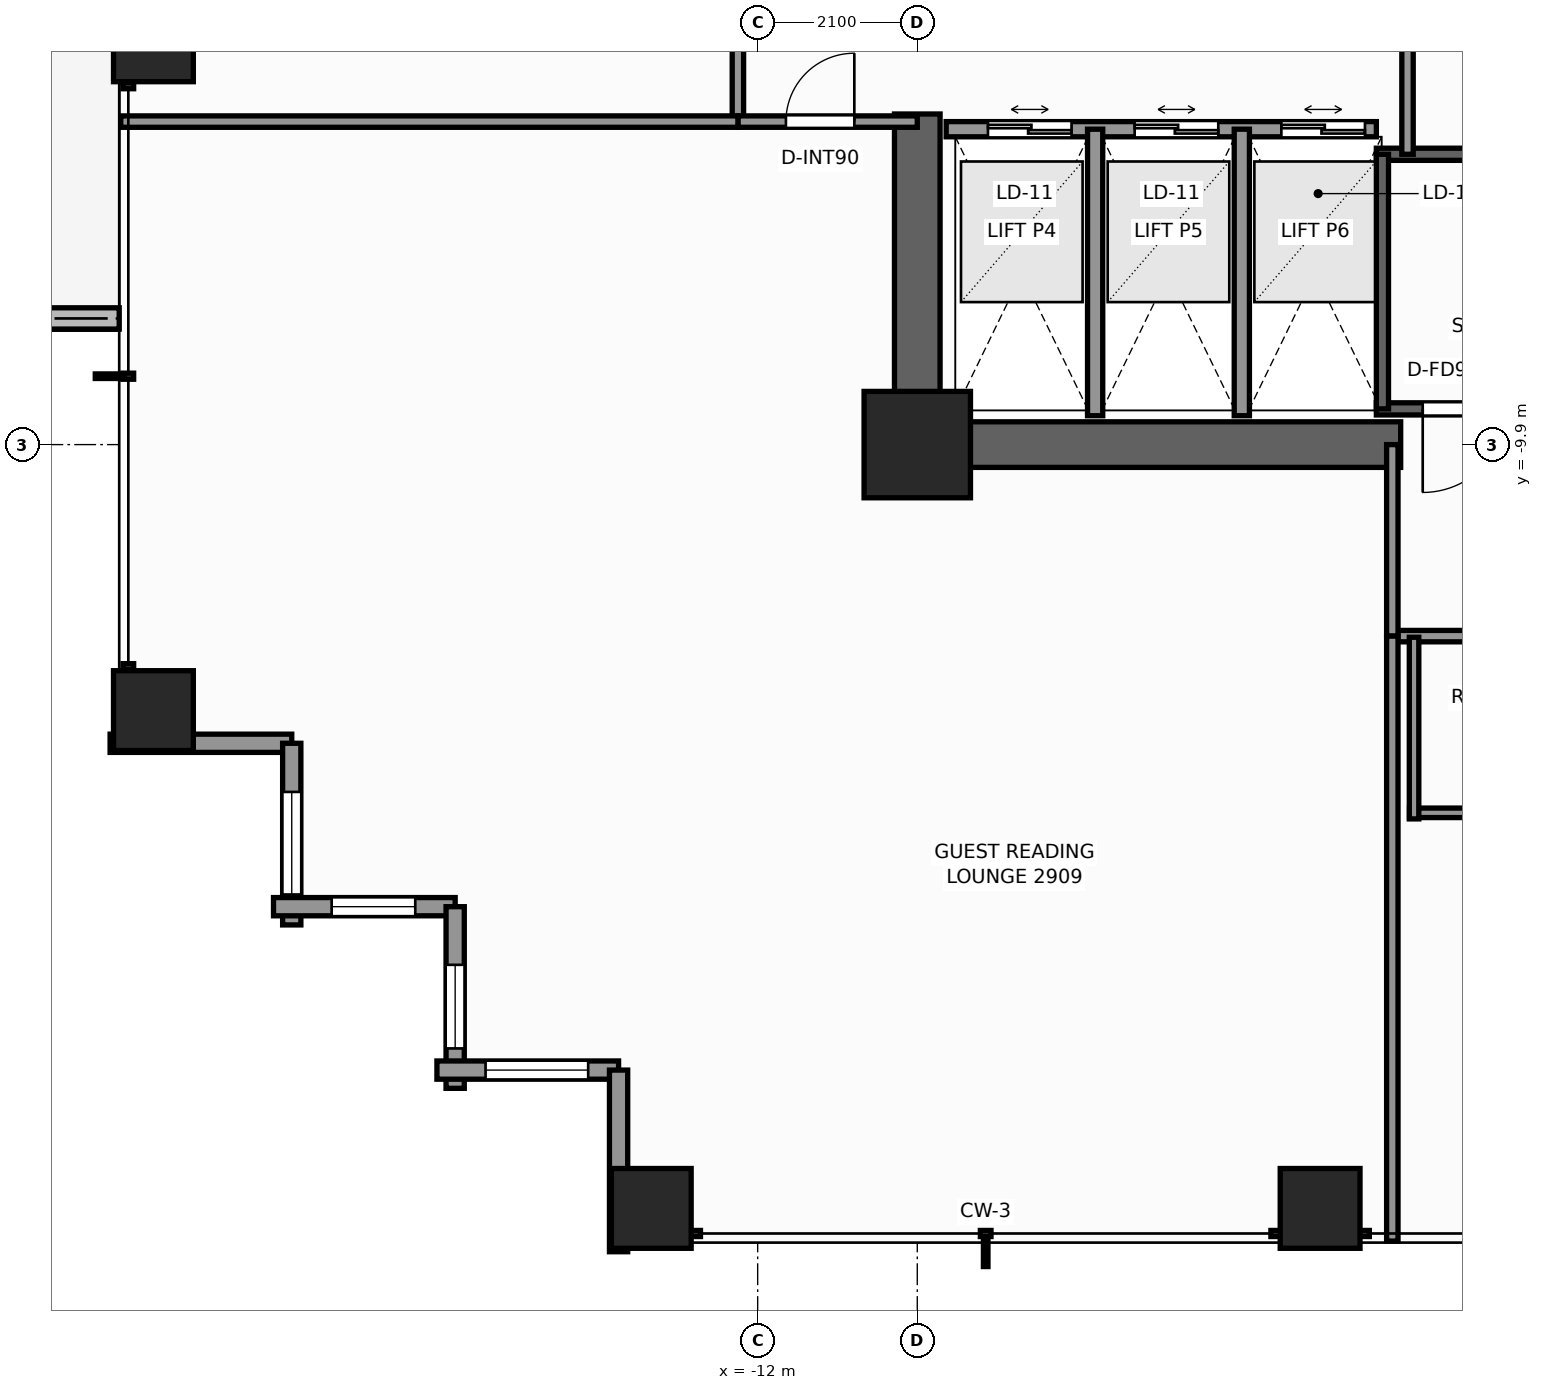
"""IFC4 building model, lengths in metres.
Left out: names, types, materials, properties, quantities, classifications, styles, units other than length and angle.
Written with IfcOpenShell. Run it as: python <this file> out.ifc"""

import sys

from ifc_helpers import new_model, si_unit, direction, frame, frame_2d, origin, origin_2d, place, context, subcontext, project, spatial, rectangle, extrude, element, fill, save


model = new_model("IFC4")
c1 = context("Model", 3, precision=1e-05, world=origin(), true_north=direction((0.0, 1.0)))
c2 = subcontext(c1, "Body", "Model", "MODEL_VIEW")
j1 = project(units=[si_unit("LENGTHUNIT", "METRE"), si_unit("PLANEANGLEUNIT", "RADIAN")], contexts=[c1])
p1 = place(None, origin())
s1 = spatial("IfcSite", under=j1, at=p1, CompositionType="ELEMENT")
p2 = place(p1, origin())
s2 = spatial("IfcBuilding", under=s1, at=p2, CompositionType="ELEMENT")
p3 = place(p2, frame((0.0, 0.0, 101.9)))
s3 = spatial("IfcBuildingStorey", under=s2, at=p3, CompositionType="ELEMENT", Elevation=101.9)
p4 = place(p3, frame((-3.54, -9.9, 0.0), z_axis=(0.0, 0.0, 1.0), x_axis=(-1.0, 0.0, 0.0)))
e1 = element("IfcWall", 1, at=p4, inside=s3, PredefinedType="SHEAR", context=c2, shape_type="SweptSolid", body=[
    extrude(rectangle(XDim=6.66, YDim=0.6, at=frame_2d((3.33, 0.0))), origin(), (0.0, 0.0, 1.0), 3.3),
])
p5 = place(p3, frame((-9.9, -9.6, 0.0), z_axis=(0.0, 0.0, 1.0), x_axis=(0.0, 1.0, 0.0)))
e2 = element("IfcWall", 2, at=p5, inside=s3, PredefinedType="SHEAR", context=c2, shape_type="SweptSolid", body=[
    extrude(rectangle(XDim=4.05, YDim=0.6, at=frame_2d((2.025, 0.0))), origin(), (0.0, 0.0, 1.0), 3.3),
])
p6 = place(p3, frame((-9.9, -9.9, 0.0), z_axis=(0.0, 0.0, 1.0), x_axis=(1.0, 0.0, 0.0)))
e3 = element("IfcColumn", 3, at=p6, inside=s3, PredefinedType="COLUMN", context=c2, shape_type="SweptSolid", body=[
    extrude(rectangle(XDim=1.4, YDim=1.4, at=origin_2d()), origin(), (0.0, 0.0, 1.0), 3.3),
])
for number, where, z_axis, x_axis in (
    (4, (-13.4, -19.95, 0.0), (0.0, 0.0, 1.0), (1.0, 0.0, 0.0)),
    (5, (-4.6, -19.95, 0.0), (0.0, 0.0, 1.0), (1.0, 0.0, 0.0)),
    (6, (-19.95, -13.4, 0.0), (0.0, 0.0, 1.0), (1.0, 0.0, 0.0)),
    (7, (-19.95, -4.6, 0.0), (0.0, 0.0, 1.0), (1.0, 0.0, 0.0)),
):
    element("IfcColumn", number, at=place(p3, frame(where, z_axis=z_axis, x_axis=x_axis)), inside=s3, PredefinedType="COLUMN", context=c2, shape_type="SweptSolid", body=[
        extrude(rectangle(XDim=1.05, YDim=1.05, at=origin_2d()), origin(), (0.0, 0.0, 1.0), 3.3),
    ])
p7 = place(p3, frame((-22.406, -8.24, -0.04), z_axis=(0.0, 0.0, 1.0), x_axis=(1.0, 0.0, 0.0)))
e8 = element("IfcWall", 8, at=p7, inside=s3, PredefinedType="PARAPET", context=c2, shape_type="SweptSolid", body=[
    extrude(rectangle(XDim=2.006, YDim=0.28, at=frame_2d((1.003, 0.0))), origin(), (0.0, 0.0, 1.0), 0.42),
])
p8 = place(p3, frame((-18.13, -13.83, 0.0), z_axis=(0.0, 0.0, 1.0), x_axis=(-1.0, 0.0, 0.0)))
e9 = element("IfcWall", 9, at=p8, inside=s3, PredefinedType="STANDARD", context=c2, shape_type="SweptSolid", body=[
    extrude(rectangle(XDim=2.39, YDim=0.24, at=frame_2d((1.195, 0.0))), origin(), (0.0, 0.0, 1.0), 2.459),
])
p9 = place(p3, frame((-18.13, -16.22, 0.0), z_axis=(0.0, 0.0, 1.0), x_axis=(0.0, 1.0, 0.0)))
e10 = element("IfcWall", 10, at=p9, inside=s3, PredefinedType="STANDARD", context=c2, shape_type="SweptSolid", body=[
    extrude(rectangle(XDim=2.39, YDim=0.24, at=frame_2d((1.195, 0.0))), origin(), (0.0, 0.0, 1.0), 2.459),
])
p10 = place(p9, frame((0.4, 0.0, 0.65)))
e11 = element("IfcOpeningElement", 11, at=p10, cuts=e10, PredefinedType="OPENING", context=c2, shape_type="SweptSolid", body=[
    extrude(rectangle(XDim=1.35, YDim=1.55, at=frame_2d((0.675, 0.775))), frame((0.0, 0.13, 0.0), z_axis=(0.0, -1.0, 0.0), x_axis=(1.0, 0.0, 0.0)), (0.0, 0.0, 1.0), 0.26),
])
p11 = place(p3, frame((-15.98, -15.98, 0.0), z_axis=(0.0, 0.0, 1.0), x_axis=(-1.0, 0.0, 0.0)))
e12 = element("IfcWall", 12, at=p11, inside=s3, PredefinedType="STANDARD", context=c2, shape_type="SweptSolid", body=[
    extrude(rectangle(XDim=2.39, YDim=0.24, at=frame_2d((1.195, 0.0))), origin(), (0.0, 0.0, 1.0), 2.459),
])
p12 = place(p11, frame((0.525, 0.0, 0.65)))
e13 = element("IfcOpeningElement", 13, at=p12, cuts=e12, PredefinedType="OPENING", context=c2, shape_type="SweptSolid", body=[
    extrude(rectangle(XDim=1.1, YDim=1.45, at=frame_2d((0.55, 0.725))), frame((0.0, 0.13, 0.0), z_axis=(0.0, -1.0, 0.0), x_axis=(1.0, 0.0, 0.0)), (0.0, 0.0, 1.0), 0.26),
])
p13 = place(p3, frame((-15.98, -18.37, 0.0), z_axis=(0.0, 0.0, 1.0), x_axis=(0.0, 1.0, 0.0)))
e14 = element("IfcWall", 14, at=p13, inside=s3, PredefinedType="STANDARD", context=c2, shape_type="SweptSolid", body=[
    extrude(rectangle(XDim=2.39, YDim=0.24, at=frame_2d((1.195, 0.0))), origin(), (0.0, 0.0, 1.0), 2.459),
])
p14 = place(p13, frame((0.525, 0.0, 0.65)))
e15 = element("IfcOpeningElement", 15, at=p14, cuts=e14, PredefinedType="OPENING", context=c2, shape_type="SweptSolid", body=[
    extrude(rectangle(XDim=1.1, YDim=1.45, at=frame_2d((0.55, 0.725))), frame((0.0, 0.13, 0.0), z_axis=(0.0, -1.0, 0.0), x_axis=(1.0, 0.0, 0.0)), (0.0, 0.0, 1.0), 0.26),
])
p15 = place(p3, frame((-13.83, -18.13, 0.0), z_axis=(0.0, 0.0, 1.0), x_axis=(-1.0, 0.0, 0.0)))
e16 = element("IfcWall", 16, at=p15, inside=s3, PredefinedType="STANDARD", context=c2, shape_type="SweptSolid", body=[
    extrude(rectangle(XDim=2.39, YDim=0.24, at=frame_2d((1.195, 0.0))), origin(), (0.0, 0.0, 1.0), 2.459),
])
p16 = place(p15, frame((0.4, 0.0, 0.65)))
e17 = element("IfcOpeningElement", 17, at=p16, cuts=e16, PredefinedType="OPENING", context=c2, shape_type="SweptSolid", body=[
    extrude(rectangle(XDim=1.35, YDim=1.55, at=frame_2d((0.675, 0.775))), frame((0.0, 0.13, 0.0), z_axis=(0.0, -1.0, 0.0), x_axis=(1.0, 0.0, 0.0)), (0.0, 0.0, 1.0), 0.26),
])
p17 = place(p3, frame((-13.83, -20.52, 0.0), z_axis=(0.0, 0.0, 1.0), x_axis=(0.0, 1.0, 0.0)))
e18 = element("IfcWall", 18, at=p17, inside=s3, PredefinedType="STANDARD", context=c2, shape_type="SweptSolid", body=[
    extrude(rectangle(XDim=2.39, YDim=0.24, at=frame_2d((1.195, 0.0))), origin(), (0.0, 0.0, 1.0), 2.459),
])
p18 = place(p3, frame((3.86, -9.43, 0.0), z_axis=(0.0, 0.0, 1.0), x_axis=(-1.0, 0.0, 0.0)))
e19 = element("IfcWall", 19, at=p18, inside=s3, PredefinedType="SHEAR", context=c2, shape_type="SweptSolid", body=[
    extrude(rectangle(XDim=7.72, YDim=0.16, at=frame_2d((3.86, 0.0))), origin(), (0.0, 0.0, 1.0), 3.3),
])
p19 = place(p18, frame((6.01, 0.0, 0.0)))
e20 = element("IfcOpeningElement", 20, at=p19, cuts=e19, PredefinedType="OPENING", context=c2, shape_type="SweptSolid", body=[
    extrude(rectangle(XDim=1.1, YDim=2.2, at=frame_2d((0.55, 1.1))), frame((0.0, 0.09, 0.0), z_axis=(0.0, -1.0, 0.0), x_axis=(1.0, 0.0, 0.0)), (0.0, 0.0, 1.0), 0.18),
])
p20 = place(p3, frame((-3.86, -6.08, 0.0), z_axis=(0.0, 0.0, 1.0), x_axis=(1.0, 0.0, 0.0)))
e21 = element("IfcWall", 21, at=p20, inside=s3, PredefinedType="SHEAR", context=c2, shape_type="SweptSolid", body=[
    extrude(rectangle(XDim=7.72, YDim=0.16, at=frame_2d((3.86, 0.0))), origin(), (0.0, 0.0, 1.0), 3.3),
])
p21 = place(p3, frame((-3.78, -9.43, 0.0), z_axis=(0.0, 0.0, 1.0), x_axis=(0.0, 1.0, 0.0)))
e22 = element("IfcWall", 22, at=p21, inside=s3, PredefinedType="SHEAR", context=c2, shape_type="SweptSolid", body=[
    extrude(rectangle(XDim=3.35, YDim=0.16, at=frame_2d((1.675, 0.0))), origin(), (0.0, 0.0, 1.0), 3.3),
])
p22 = place(p3, frame((-9.52, -5.75, 0.0), z_axis=(0.0, 0.0, 1.0), x_axis=(1.0, 0.0, 0.0)))
e23 = element("IfcWall", 23, at=p22, inside=s3, PredefinedType="SOLIDWALL", context=c2, shape_type="SweptSolid", body=[
    extrude(rectangle(XDim=5.66, YDim=0.2, at=frame_2d((2.83, 0.0))), origin(), (0.0, 0.0, 1.0), 3.08),
])
p23 = place(p22, frame((0.55, 0.0, 0.0)))
e24 = element("IfcOpeningElement", 24, at=p23, cuts=e23, PredefinedType="OPENING", context=c2, shape_type="SweptSolid", body=[
    extrude(rectangle(XDim=1.1, YDim=2.2, at=frame_2d((0.55, 1.1))), frame((0.0, 0.11, 0.0), z_axis=(0.0, -1.0, 0.0), x_axis=(1.0, 0.0, 0.0)), (0.0, 0.0, 1.0), 0.22),
])
p24 = place(p22, frame((2.48, 0.0, 0.0)))
e25 = element("IfcOpeningElement", 25, at=p24, cuts=e23, PredefinedType="OPENING", context=c2, shape_type="SweptSolid", body=[
    extrude(rectangle(XDim=1.1, YDim=2.2, at=frame_2d((0.55, 1.1))), frame((0.0, 0.11, 0.0), z_axis=(0.0, -1.0, 0.0), x_axis=(1.0, 0.0, 0.0)), (0.0, 0.0, 1.0), 0.22),
])
p25 = place(p22, frame((4.41, 0.0, 0.0)))
e26 = element("IfcOpeningElement", 26, at=p25, cuts=e23, PredefinedType="OPENING", context=c2, shape_type="SweptSolid", body=[
    extrude(rectangle(XDim=1.1, YDim=2.2, at=frame_2d((0.55, 1.1))), frame((0.0, 0.11, 0.0), z_axis=(0.0, -1.0, 0.0), x_axis=(1.0, 0.0, 0.0)), (0.0, 0.0, 1.0), 0.22),
])
for number, where, z_axis, x_axis in (
    (27, (-7.56, -9.52, 0.0), (0.0, 0.0, 1.0), (0.0, 1.0, 0.0)),
    (28, (-5.63, -9.52, 0.0), (0.0, 0.0, 1.0), (0.0, 1.0, 0.0)),
):
    element("IfcWall", number, at=place(p3, frame(where, z_axis=z_axis, x_axis=x_axis)), inside=s3, PredefinedType="SOLIDWALL", context=c2, shape_type="SweptSolid", body=[
        extrude(rectangle(XDim=3.77, YDim=0.2, at=frame_2d((1.885, 0.0))), origin(), (0.0, 0.0, 1.0), 3.08),
    ])
p26 = place(p3, frame((-3.45, -6.08, 0.0), z_axis=(0.0, 0.0, 1.0), x_axis=(0.0, 1.0, 0.0)))
e29 = element("IfcWall", 29, at=p26, inside=s3, PredefinedType="PARTITIONING", context=c2, shape_type="SweptSolid", body=[
    extrude(rectangle(XDim=2.36, YDim=0.15, at=frame_2d((1.18, 0.0))), origin(), (0.0, 0.0, 1.0), 3.08),
])
p27 = place(p3, frame((-3.65, -12.42, 0.0), z_axis=(0.0, 0.0, 1.0), x_axis=(1.0, 0.0, 0.0)))
e30 = element("IfcWall", 30, at=p27, inside=s3, PredefinedType="PARTITIONING", context=c2, shape_type="SweptSolid", body=[
    extrude(rectangle(XDim=15.91, YDim=0.15, at=frame_2d((7.955, 0.0))), origin(), (0.0, 0.0, 1.0), 2.292),
])
p28 = place(p27, frame((3.749, 0.0, 0.0)))
e31 = element("IfcOpeningElement", 31, at=p28, cuts=e30, PredefinedType="OPENING", context=c2, shape_type="SweptSolid", body=[
    extrude(rectangle(XDim=0.95, YDim=2.06, at=frame_2d((0.475, 1.03))), frame((0.0, 0.085, 0.0), z_axis=(0.0, -1.0, 0.0), x_axis=(1.0, 0.0, 0.0)), (0.0, 0.0, 1.0), 0.17),
])
p29 = place(p27, frame((9.999, 0.0, 0.0)))
e32 = element("IfcOpeningElement", 32, at=p29, cuts=e30, PredefinedType="OPENING", context=c2, shape_type="SweptSolid", body=[
    extrude(rectangle(XDim=0.95, YDim=2.06, at=frame_2d((0.475, 1.03))), frame((0.0, 0.085, 0.0), z_axis=(0.0, -1.0, 0.0), x_axis=(1.0, 0.0, 0.0)), (0.0, 0.0, 1.0), 0.17),
])
p30 = place(p27, frame((12.193, 0.0, 0.0)))
e33 = element("IfcOpeningElement", 33, at=p30, cuts=e30, PredefinedType="OPENING", context=c2, shape_type="SweptSolid", body=[
    extrude(rectangle(XDim=0.9, YDim=2.06, at=frame_2d((0.45, 1.03))), frame((0.0, 0.085, 0.0), z_axis=(0.0, -1.0, 0.0), x_axis=(1.0, 0.0, 0.0)), (0.0, 0.0, 1.0), 0.17),
])
p31 = place(p3, frame((-3.65, -12.42, 0.0), z_axis=(0.0, 0.0, 1.0), x_axis=(0.0, 1.0, 0.0)))
e34 = element("IfcWall", 34, at=p31, inside=s3, PredefinedType="PARTITIONING", context=c2, shape_type="SweptSolid", body=[
    extrude(rectangle(XDim=2.52, YDim=0.15, at=frame_2d((1.26, 0.0))), origin(), (0.0, 0.0, 1.0), 3.08),
])
p32 = place(p3, frame((-12.26, -5.65, 0.0), z_axis=(0.0, 0.0, 1.0), x_axis=(0.0, 1.0, 0.0)))
e35 = element("IfcWall", 35, at=p32, inside=s3, PredefinedType="PARTITIONING", context=c2, shape_type="SweptSolid", body=[
    extrude(rectangle(XDim=3.6, YDim=0.15, at=frame_2d((1.8, 0.0))), origin(), (0.0, 0.0, 1.0), 2.292),
])
p33 = place(p32, frame((2.156, 0.0, 0.0)))
e36 = element("IfcOpeningElement", 36, at=p33, cuts=e35, PredefinedType="OPENING", context=c2, shape_type="SweptSolid", body=[
    extrude(rectangle(XDim=0.9, YDim=2.06, at=frame_2d((0.45, 1.03))), frame((0.0, 0.085, 0.0), z_axis=(0.0, -1.0, 0.0), x_axis=(1.0, 0.0, 0.0)), (0.0, 0.0, 1.0), 0.17),
])
p34 = place(p3, frame((-12.26, -5.65, 0.0), z_axis=(0.0, 0.0, 1.0), x_axis=(1.0, 0.0, 0.0)))
e37 = element("IfcWall", 37, at=p34, inside=s3, PredefinedType="PARTITIONING", context=c2, shape_type="SweptSolid", body=[
    extrude(rectangle(XDim=2.36, YDim=0.15, at=frame_2d((1.18, 0.0))), origin(), (0.0, 0.0, 1.0), 3.08),
])
p35 = place(p34, frame((0.632, 0.0, 0.0)))
e38 = element("IfcOpeningElement", 38, at=p35, cuts=e37, PredefinedType="OPENING", context=c2, shape_type="SweptSolid", body=[
    extrude(rectangle(XDim=0.9, YDim=2.06, at=frame_2d((0.45, 1.03))), frame((0.0, 0.085, 0.0), z_axis=(0.0, -1.0, 0.0), x_axis=(1.0, 0.0, 0.0)), (0.0, 0.0, 1.0), 0.17),
])
p36 = place(p3, frame((-20.38, -5.65, 0.0), z_axis=(0.0, 0.0, 1.0), x_axis=(1.0, 0.0, 0.0)))
e39 = element("IfcWall", 39, at=p36, inside=s3, PredefinedType="PARTITIONING", context=c2, shape_type="SweptSolid", body=[
    extrude(rectangle(XDim=8.12, YDim=0.15, at=frame_2d((4.06, 0.0))), origin(), (0.0, 0.0, 1.0), 2.449),
])
p37 = place(p3, frame((-3.65, -20.38, 0.0), z_axis=(0.0, 0.0, 1.0), x_axis=(0.0, 1.0, 0.0)))
e40 = element("IfcWall", 40, at=p37, inside=s3, PredefinedType="PARTITIONING", context=c2, shape_type="SweptSolid", body=[
    extrude(rectangle(XDim=7.96, YDim=0.15, at=frame_2d((3.98, 0.0))), origin(), (0.0, 0.0, 1.0), 2.449),
])
p38 = place(p3, frame((-3.424, -14.745, 0.0), z_axis=(0.0, 0.0, 1.0), x_axis=(1.0, 0.0, 0.0)))
e41 = element("IfcWall", 41, at=p38, inside=s3, PredefinedType="PARTITIONING", context=c2, shape_type="SweptSolid", body=[
    extrude(rectangle(XDim=2.77, YDim=0.125, at=frame_2d((1.385, 0.0))), origin(), (0.0, 0.0, 1.0), 3.08),
])
p39 = place(p3, frame((-3.364, -14.825, 0.0), z_axis=(0.0, 0.0, 1.0), x_axis=(0.0, 1.0, 0.0)))
e42 = element("IfcWall", 42, at=p39, inside=s3, PredefinedType="PARTITIONING", context=c2, shape_type="SweptSolid", body=[
    extrude(rectangle(XDim=2.39, YDim=0.125, at=frame_2d((1.195, 0.0))), origin(), (0.0, 0.0, 1.0), 3.08),
])
p40 = place(p10, origin())
e43 = element("IfcWindow", 43, at=p40, inside=s3, PartitioningType="SINGLE_PANEL", PredefinedType="WINDOW", context=c2, shape_type="SweptSolid", body=[
    extrude(rectangle(XDim=1.35, YDim=1.55, at=frame_2d((0.675, 0.775))), frame((0.0, 0.03, 0.0), z_axis=(0.0, -1.0, 0.0), x_axis=(1.0, 0.0, 0.0)), (0.0, 0.0, 1.0), 0.06),
])
fill(e11, e43)
p41 = place(p12, origin())
e44 = element("IfcWindow", 44, at=p41, inside=s3, PartitioningType="SINGLE_PANEL", PredefinedType="WINDOW", context=c2, shape_type="SweptSolid", body=[
    extrude(rectangle(XDim=1.1, YDim=1.45, at=frame_2d((0.55, 0.725))), frame((0.0, 0.03, 0.0), z_axis=(0.0, -1.0, 0.0), x_axis=(1.0, 0.0, 0.0)), (0.0, 0.0, 1.0), 0.06),
])
fill(e13, e44)
p42 = place(p14, origin())
e45 = element("IfcWindow", 45, at=p42, inside=s3, PartitioningType="SINGLE_PANEL", PredefinedType="WINDOW", context=c2, shape_type="SweptSolid", body=[
    extrude(rectangle(XDim=1.1, YDim=1.45, at=frame_2d((0.55, 0.725))), frame((0.0, 0.03, 0.0), z_axis=(0.0, -1.0, 0.0), x_axis=(1.0, 0.0, 0.0)), (0.0, 0.0, 1.0), 0.06),
])
fill(e15, e45)
p43 = place(p16, origin())
e46 = element("IfcWindow", 46, at=p43, inside=s3, PartitioningType="SINGLE_PANEL", PredefinedType="WINDOW", context=c2, shape_type="SweptSolid", body=[
    extrude(rectangle(XDim=1.35, YDim=1.55, at=frame_2d((0.675, 0.775))), frame((0.0, 0.03, 0.0), z_axis=(0.0, -1.0, 0.0), x_axis=(1.0, 0.0, 0.0)), (0.0, 0.0, 1.0), 0.06),
])
fill(e17, e46)
p44 = place(p19, origin())
e47 = element("IfcDoor", 47, at=p44, inside=s3, OperationType="SINGLE_SWING_RIGHT", PredefinedType="DOOR", context=c2, shape_type="SweptSolid", body=[
    extrude(rectangle(XDim=1.1, YDim=2.2, at=frame_2d((0.55, 1.1))), frame((0.0, 0.025, 0.0), z_axis=(0.0, -1.0, 0.0), x_axis=(1.0, 0.0, 0.0)), (0.0, 0.0, 1.0), 0.05),
])
fill(e20, e47)
p45 = place(p23, origin())
e48 = element("IfcDoor", 48, at=p45, inside=s3, OperationType="DOUBLE_DOOR_SLIDING", PredefinedType="DOOR", context=c2, shape_type="SweptSolid", body=[
    extrude(rectangle(XDim=1.1, YDim=2.2, at=frame_2d((0.55, 1.1))), frame((0.0, 0.025, 0.0), z_axis=(0.0, -1.0, 0.0), x_axis=(1.0, 0.0, 0.0)), (0.0, 0.0, 1.0), 0.05),
])
fill(e24, e48)
p46 = place(p24, origin())
e49 = element("IfcDoor", 49, at=p46, inside=s3, OperationType="DOUBLE_DOOR_SLIDING", PredefinedType="DOOR", context=c2, shape_type="SweptSolid", body=[
    extrude(rectangle(XDim=1.1, YDim=2.2, at=frame_2d((0.55, 1.1))), frame((0.0, 0.025, 0.0), z_axis=(0.0, -1.0, 0.0), x_axis=(1.0, 0.0, 0.0)), (0.0, 0.0, 1.0), 0.05),
])
fill(e25, e49)
p47 = place(p25, origin())
e50 = element("IfcDoor", 50, at=p47, inside=s3, OperationType="DOUBLE_DOOR_SLIDING", PredefinedType="DOOR", context=c2, shape_type="SweptSolid", body=[
    extrude(rectangle(XDim=1.1, YDim=2.2, at=frame_2d((0.55, 1.1))), frame((0.0, 0.025, 0.0), z_axis=(0.0, -1.0, 0.0), x_axis=(1.0, 0.0, 0.0)), (0.0, 0.0, 1.0), 0.05),
])
fill(e26, e50)
p48 = place(p35, origin())
e51 = element("IfcDoor", 51, at=p48, inside=s3, OperationType="SINGLE_SWING_RIGHT", PredefinedType="DOOR", context=c2, shape_type="SweptSolid", body=[
    extrude(rectangle(XDim=0.9, YDim=2.06, at=frame_2d((0.45, 1.03))), frame((0.0, 0.025, 0.0), z_axis=(0.0, -1.0, 0.0), x_axis=(1.0, 0.0, 0.0)), (0.0, 0.0, 1.0), 0.05),
])
fill(e38, e51)
save(model, sys.argv[1])
